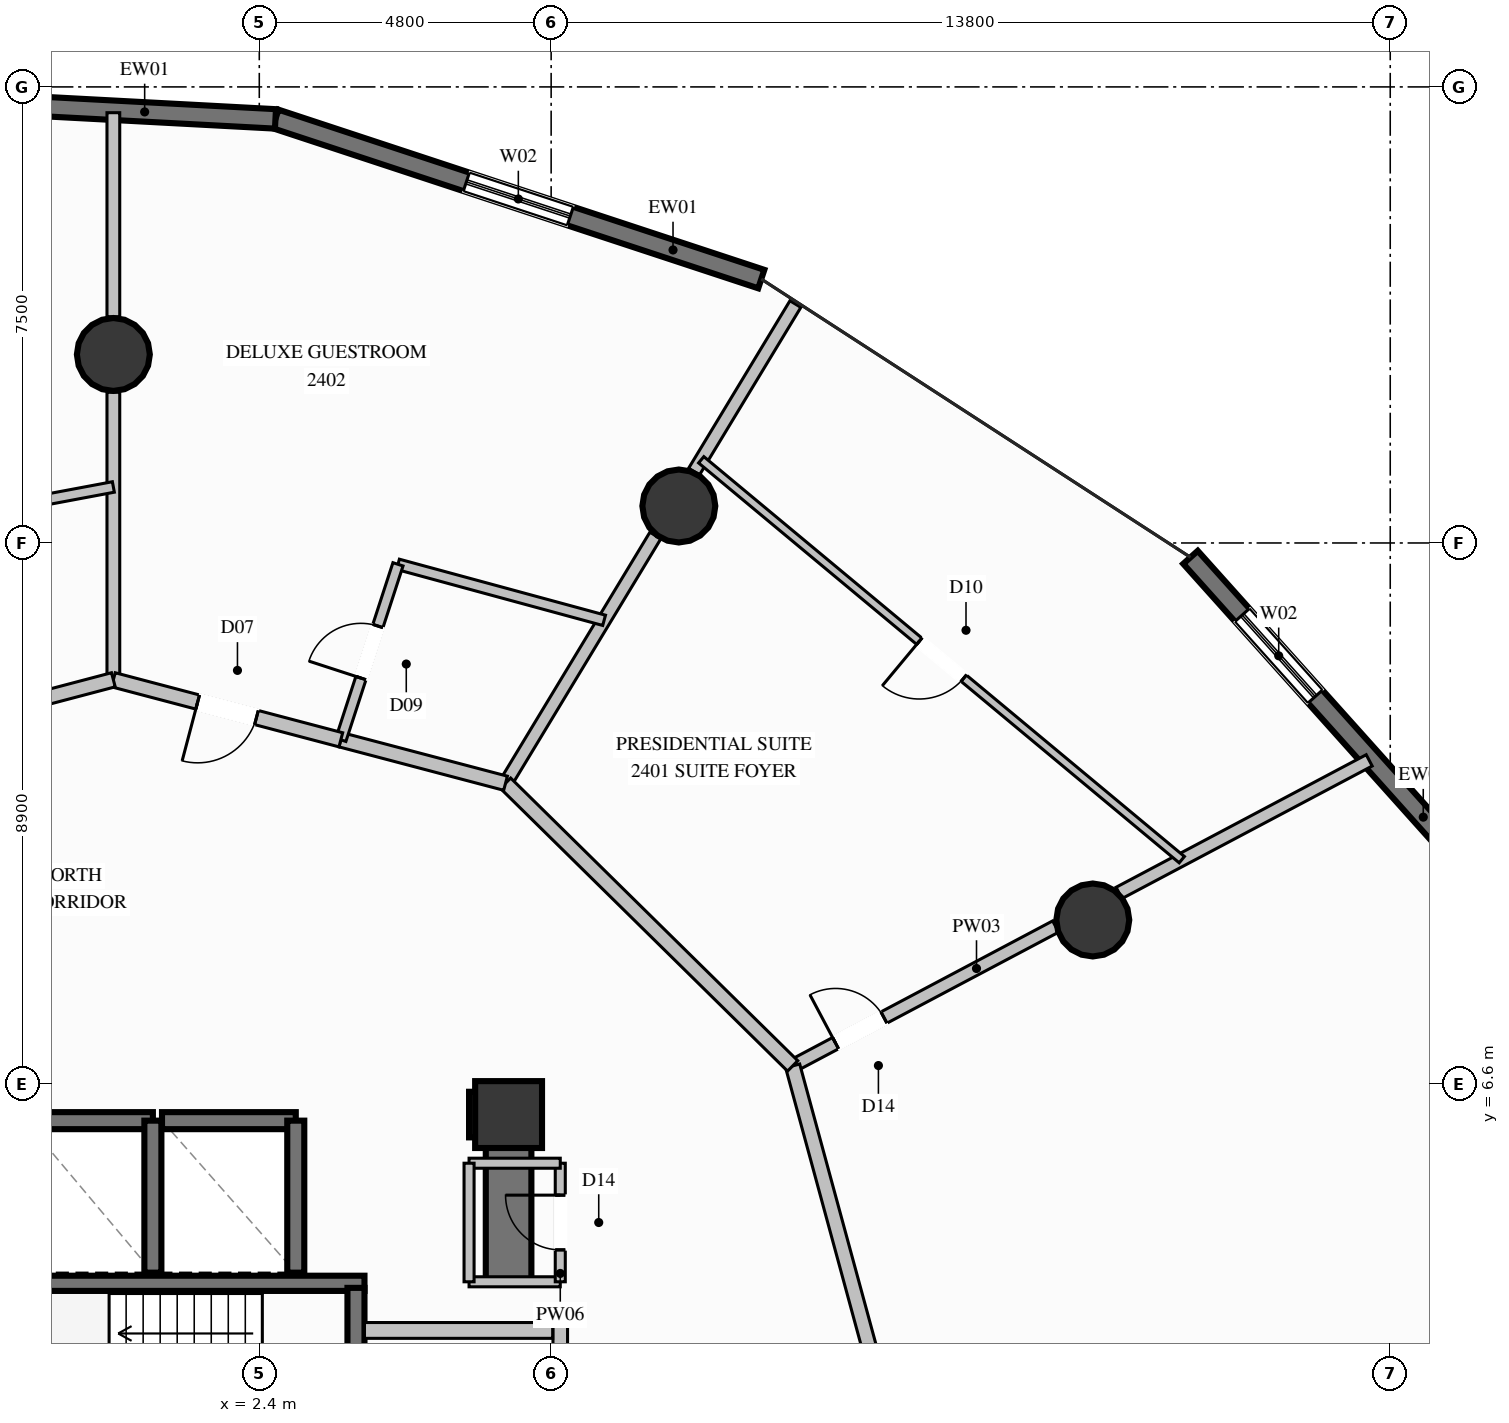
"""IFC4 building model, lengths in metres.
Left out: names, types, materials, properties, quantities, classifications, styles, units other than length and angle.
Written with IfcOpenShell. Run it as: python <this file> out.ifc"""

import sys

from ifc_helpers import new_model, si_unit, direction, frame, frame_2d, origin, origin_2d, place, context, subcontext, project, spatial, rectangle, circle, extrude, element, fill, save


model = new_model("IFC4")
c1 = context("Model", 3, precision=1e-05, world=origin(), true_north=direction((0.0, 1.0)))
c2 = subcontext(c1, "Body", "Model", "MODEL_VIEW")
j1 = project(units=[si_unit("LENGTHUNIT", "METRE"), si_unit("PLANEANGLEUNIT", "RADIAN")], contexts=[c1])
p1 = place(None, origin())
s1 = spatial("IfcSite", under=j1, at=p1, CompositionType="ELEMENT")
p2 = place(p1, origin())
s2 = spatial("IfcBuilding", under=s1, at=p2, CompositionType="ELEMENT")
p3 = place(p2, frame((0.0, 0.0, 89.6)))
s3 = spatial("IfcBuildingStorey", under=s2, at=p3, CompositionType="ELEMENT", Elevation=89.6)
p4 = place(p3, frame((6.5, 6.1, 0.0), z_axis=(0.0, 0.0, 1.0), x_axis=(1.0, 0.0, 0.0)))
e1 = element("IfcColumn", 1, at=p4, inside=s3, PredefinedType="COLUMN", context=c2, shape_type="SweptSolid", body=[
    extrude(rectangle(XDim=1.1, YDim=1.1, at=origin_2d()), origin(), (0.0, 0.0, 1.0), 3.6),
])
p5 = place(p3, frame((-4.13, 3.325, 0.0), z_axis=(0.0, 0.0, 1.0), x_axis=(1.0, 0.0, 0.0)))
e2 = element("IfcWall", 2, at=p5, inside=s3, PredefinedType="SOLIDWALL", context=c2, shape_type="SweptSolid", body=[
    extrude(rectangle(XDim=8.26, YDim=0.25, at=frame_2d((4.13, 0.0))), origin(), (0.0, 0.0, 1.0), 3.6),
])
p6 = place(p3, frame((5.85, 6.1, 0.0), z_axis=(0.0, 0.0, 1.0), x_axis=(1.0, 0.0, 0.0)))
e3 = element("IfcWall", 3, at=p6, inside=s3, PredefinedType="SHEAR", context=c2, shape_type="SweptSolid", body=[
    extrude(rectangle(XDim=0.275, YDim=0.75, at=frame_2d((0.137, 0.0))), origin(), (0.0, 0.0, 1.0), 3.6),
])
p7 = place(p3, frame((6.5, 3.35, 0.0), z_axis=(0.0, 0.0, 1.0), x_axis=(0.0, 1.0, 0.0)))
e4 = element("IfcWall", 4, at=p7, inside=s3, PredefinedType="SHEAR", context=c2, shape_type="SweptSolid", body=[
    extrude(rectangle(XDim=3.125, YDim=0.75, at=frame_2d((1.562, 0.0))), origin(), (0.0, 0.0, 1.0), 3.6),
])
for number, where, z_axis, x_axis in (
    (5, (16.108, 9.3, 0.0), (0.0, 0.0, 1.0), (1.0, 0.0, 0.0)),
    (6, (9.3, 16.108, 0.0), (0.0, 0.0, 1.0), (1.0, 0.0, 0.0)),
    (7, (0.0, 18.6, 0.0), (0.0, 0.0, 1.0), (1.0, 0.0, 0.0)),
):
    element("IfcColumn", number, at=place(p3, frame(where, z_axis=z_axis, x_axis=x_axis)), inside=s3, PredefinedType="COLUMN", context=c2, shape_type="SweptSolid", body=[
        extrude(circle(Radius=0.6, at=origin_2d()), origin(), (0.0, 0.0, 1.0), 3.6),
    ])
p8 = place(p3, frame((17.715, 15.264, 0.0), z_axis=(0.0, 0.0, 1.0), x_axis=(0.667278098427, -0.744808659563, 0.0)))
e8 = element("IfcWall", 8, at=p8, inside=s3, PredefinedType="SOLIDWALL", context=c2, shape_type="SweptSolid", body=[
    extrude(rectangle(XDim=8.149, YDim=0.32, at=frame_2d((4.075, 0.0))), origin(), (0.0, 0.0, 1.0), 3.2),
])
p9 = place(p8, frame((1.274, 0.0, 0.35)))
e9 = element("IfcOpeningElement", 9, at=p9, cuts=e8, PredefinedType="OPENING", context=c2, shape_type="SweptSolid", body=[
    extrude(rectangle(XDim=1.8, YDim=2.6, at=frame_2d((0.9, 1.3))), frame((0.0, 0.17, 0.0), z_axis=(0.0, -1.0, 0.0), x_axis=(1.0, 0.0, 0.0)), (0.0, 0.0, 1.0), 0.34),
])
p10 = place(p3, frame((2.666, 22.474, 0.0), z_axis=(0.0, 0.0, 1.0), x_axis=(0.949722824856, -0.313091928908, 0.0)))
e10 = element("IfcWall", 10, at=p10, inside=s3, PredefinedType="SOLIDWALL", context=c2, shape_type="SweptSolid", body=[
    extrude(rectangle(XDim=8.413, YDim=0.32, at=frame_2d((4.207, 0.0))), origin(), (0.0, 0.0, 1.0), 3.2),
])
p11 = place(p10, frame((3.306, 0.0, 0.35)))
e11 = element("IfcOpeningElement", 11, at=p11, cuts=e10, PredefinedType="OPENING", context=c2, shape_type="SweptSolid", body=[
    extrude(rectangle(XDim=1.8, YDim=2.6, at=frame_2d((0.9, 1.3))), frame((0.0, 0.17, 0.0), z_axis=(0.0, -1.0, 0.0), x_axis=(1.0, 0.0, 0.0)), (0.0, 0.0, 1.0), 0.34),
])
p12 = place(p3, frame((-5.472, 22.908, 0.0), z_axis=(0.0, 0.0, 1.0), x_axis=(0.998582015263, -0.053234939583, 0.0)))
e12 = element("IfcWall", 12, at=p12, inside=s3, PredefinedType="SOLIDWALL", context=c2, shape_type="SweptSolid", body=[
    extrude(rectangle(XDim=8.149, YDim=0.32, at=frame_2d((4.075, 0.0))), origin(), (0.0, 0.0, 1.0), 3.2),
])
p13 = place(p12, frame((1.791, 0.0, 0.35)))
e13 = element("IfcOpeningElement", 13, at=p13, cuts=e12, PredefinedType="OPENING", context=c2, shape_type="SweptSolid", body=[
    extrude(rectangle(XDim=1.8, YDim=2.6, at=frame_2d((0.9, 1.3))), frame((0.0, 0.17, 0.0), z_axis=(0.0, -1.0, 0.0), x_axis=(1.0, 0.0, 0.0)), (0.0, 0.0, 1.0), 0.34),
])
p14 = place(p3, frame((0.65, 6.0, 0.0), z_axis=(0.0, 0.0, 1.0), x_axis=(-1.0, 0.0, 0.0)))
e14 = element("IfcWall", 14, at=p14, inside=s3, PredefinedType="SOLIDWALL", context=c2, shape_type="SweptSolid", body=[
    extrude(rectangle(XDim=2.1, YDim=0.28, at=frame_2d((1.05, 0.0))), origin(), (0.0, 0.0, 1.0), 3.2),
])
p15 = place(p3, frame((0.65, 3.5, 0.0), z_axis=(0.0, 0.0, 1.0), x_axis=(0.0, 1.0, 0.0)))
e15 = element("IfcWall", 15, at=p15, inside=s3, PredefinedType="SOLIDWALL", context=c2, shape_type="SweptSolid", body=[
    extrude(rectangle(XDim=2.5, YDim=0.28, at=frame_2d((1.25, 0.0))), origin(), (0.0, 0.0, 1.0), 3.2),
])
p16 = place(p3, frame((3.0, 6.0, 0.0), z_axis=(0.0, 0.0, 1.0), x_axis=(-1.0, 0.0, 0.0)))
e16 = element("IfcWall", 16, at=p16, inside=s3, PredefinedType="SOLIDWALL", context=c2, shape_type="SweptSolid", body=[
    extrude(rectangle(XDim=2.2, YDim=0.28, at=frame_2d((1.1, 0.0))), origin(), (0.0, 0.0, 1.0), 3.2),
])
p17 = place(p3, frame((3.0, 3.5, 0.0), z_axis=(0.0, 0.0, 1.0), x_axis=(0.0, 1.0, 0.0)))
e17 = element("IfcWall", 17, at=p17, inside=s3, PredefinedType="SOLIDWALL", context=c2, shape_type="SweptSolid", body=[
    extrude(rectangle(XDim=2.5, YDim=0.28, at=frame_2d((1.25, 0.0))), origin(), (0.0, 0.0, 1.0), 3.2),
])
p18 = place(p3, frame((3.99, -2.21, 0.0), z_axis=(0.0, 0.0, 1.0), x_axis=(0.0, 1.0, 0.0)))
e18 = element("IfcWall", 18, at=p18, inside=s3, PredefinedType="SOLIDWALL", context=c2, shape_type="SweptSolid", body=[
    extrude(rectangle(XDim=5.46, YDim=0.28, at=frame_2d((2.73, 0.0))), origin(), (0.0, 0.0, 1.0), 3.2),
])
p19 = place(p18, frame((3.323, 0.0, 0.0)))
e19 = element("IfcOpeningElement", 19, at=p19, cuts=e18, PredefinedType="OPENING", context=c2, shape_type="SweptSolid", body=[
    extrude(rectangle(XDim=1.2, YDim=2.2, at=frame_2d((0.6, 1.1))), frame((0.0, 0.15, 0.0), z_axis=(0.0, -1.0, 0.0), x_axis=(1.0, 0.0, 0.0)), (0.0, 0.0, 1.0), 0.3),
])
p20 = place(p3, frame((7.35, -2.34, 0.0), z_axis=(0.0, 0.0, 1.0), x_axis=(0.0, 1.0, 0.0)))
e20 = element("IfcWall", 20, at=p20, inside=s3, PredefinedType="PARTITIONING", context=c2, shape_type="SweptSolid", body=[
    extrude(rectangle(XDim=5.02, YDim=0.24, at=frame_2d((2.51, 0.0))), origin(), (0.0, 0.0, 1.0), 3.2),
])
p21 = place(p20, frame((2.678, 0.0, 0.0)))
e21 = element("IfcOpeningElement", 21, at=p21, cuts=e20, PredefinedType="OPENING", context=c2, shape_type="SweptSolid", body=[
    extrude(rectangle(XDim=0.9, YDim=2.02, at=frame_2d((0.45, 1.01))), frame((0.0, 0.13, 0.0), z_axis=(0.0, -1.0, 0.0), x_axis=(1.0, 0.0, 0.0)), (0.0, 0.0, 1.0), 0.26),
])
p22 = place(p3, frame((4.13, 2.55, 0.0), z_axis=(0.0, 0.0, 1.0), x_axis=(1.0, 0.0, 0.0)))
e22 = element("IfcWall", 22, at=p22, inside=s3, PredefinedType="PARTITIONING", context=c2, shape_type="SweptSolid", body=[
    extrude(rectangle(XDim=3.095, YDim=0.26, at=frame_2d((1.548, 0.0))), origin(), (0.0, 0.0, 1.0), 3.2),
])
p23 = place(p3, frame((5.85, 3.35, 0.0), z_axis=(0.0, 0.0, 1.0), x_axis=(1.0, 0.0, 0.0)))
e23 = element("IfcWall", 23, at=p23, inside=s3, PredefinedType="PARTITIONING", context=c2, shape_type="SweptSolid", body=[
    extrude(rectangle(XDim=1.5, YDim=0.165, at=frame_2d((0.75, 0.0))), origin(), (0.0, 0.0, 1.0), 3.2),
])
p24 = place(p3, frame((7.35, 3.35, 0.0), z_axis=(0.0, 0.0, 1.0), x_axis=(0.0, 1.0, 0.0)))
e24 = element("IfcWall", 24, at=p24, inside=s3, PredefinedType="PARTITIONING", context=c2, shape_type="SweptSolid", body=[
    extrude(rectangle(XDim=1.95, YDim=0.165, at=frame_2d((0.975, 0.0))), origin(), (0.0, 0.0, 1.0), 3.2),
])
p25 = place(p24, frame((0.525, 0.0, 0.0)))
e25 = element("IfcOpeningElement", 25, at=p25, cuts=e24, PredefinedType="OPENING", context=c2, shape_type="SweptSolid", body=[
    extrude(rectangle(XDim=0.9, YDim=2.02, at=frame_2d((0.45, 1.01))), frame((0.0, 0.093, 0.0), z_axis=(0.0, -1.0, 0.0), x_axis=(1.0, 0.0, 0.0)), (0.0, 0.0, 1.0), 0.185),
])
p26 = place(p3, frame((7.35, 5.3, 0.0), z_axis=(0.0, 0.0, 1.0), x_axis=(-1.0, 0.0, 0.0)))
e26 = element("IfcWall", 26, at=p26, inside=s3, PredefinedType="PARTITIONING", context=c2, shape_type="SweptSolid", body=[
    extrude(rectangle(XDim=1.5, YDim=0.165, at=frame_2d((0.75, 0.0))), origin(), (0.0, 0.0, 1.0), 3.2),
])
p27 = place(p3, frame((5.85, 5.3, 0.0), z_axis=(0.0, 0.0, 1.0), x_axis=(0.0, -1.0, 0.0)))
e27 = element("IfcWall", 27, at=p27, inside=s3, PredefinedType="PARTITIONING", context=c2, shape_type="SweptSolid", body=[
    extrude(rectangle(XDim=1.95, YDim=0.165, at=frame_2d((0.975, 0.0))), origin(), (0.0, 0.0, 1.0), 2.067),
])
p28 = place(p3, frame((11.172, 6.9, 0.0), z_axis=(0.0, 0.0, 1.0), x_axis=(0.883592505471, 0.468256643599, 0.0)))
e28 = element("IfcWall", 28, at=p28, inside=s3, PredefinedType="PARTITIONING", context=c2, shape_type="SweptSolid", body=[
    extrude(rectangle(XDim=4.895, YDim=0.21, at=frame_2d((2.447, 0.0))), origin(), (0.0, 0.0, 1.0), 2.067),
])
p29 = place(p28, frame((0.799, 0.0, 0.0)))
e29 = element("IfcOpeningElement", 29, at=p29, cuts=e28, PredefinedType="OPENING", context=c2, shape_type="SweptSolid", body=[
    extrude(rectangle(XDim=0.9, YDim=2.02, at=frame_2d((0.45, 1.01))), frame((0.0, 0.115, 0.0), z_axis=(0.0, -1.0, 0.0), x_axis=(1.0, 0.0, 0.0)), (0.0, 0.0, 1.0), 0.23),
])
p30 = place(p3, frame((16.54, 9.745, 0.0), z_axis=(0.0, 0.0, 1.0), x_axis=(0.883616940901, 0.468210531441, 0.0)))
e30 = element("IfcWall", 30, at=p30, inside=s3, PredefinedType="PARTITIONING", context=c2, shape_type="SweptSolid", body=[
    extrude(rectangle(XDim=4.656, YDim=0.21, at=frame_2d((2.328, 0.0))), origin(), (0.0, 0.0, 1.0), 3.2),
])
p31 = place(p3, frame((6.45, 11.549, 0.0), z_axis=(0.0, 0.0, 1.0), x_axis=(0.517538966695, 0.855659639081, 0.0)))
e31 = element("IfcWall", 31, at=p31, inside=s3, PredefinedType="PARTITIONING", context=c2, shape_type="SweptSolid", body=[
    extrude(rectangle(XDim=4.761, YDim=0.21, at=frame_2d((2.381, 0.0))), origin(), (0.0, 0.0, 1.0), 2.067),
])
p32 = place(p3, frame((9.551, 16.675, 0.0), z_axis=(0.0, 0.0, 1.0), x_axis=(0.517615669933, 0.855613241038, 0.0)))
e32 = element("IfcWall", 32, at=p32, inside=s3, PredefinedType="PARTITIONING", context=c2, shape_type="SweptSolid", body=[
    extrude(rectangle(XDim=3.219, YDim=0.21, at=frame_2d((1.609, 0.0))), origin(), (0.0, 0.0, 1.0), 3.2),
])
p33 = place(p3, frame((0.0, 13.25, 0.0), z_axis=(0.0, 0.0, 1.0), x_axis=(0.0, 1.0, 0.0)))
e33 = element("IfcWall", 33, at=p33, inside=s3, PredefinedType="PARTITIONING", context=c2, shape_type="SweptSolid", body=[
    extrude(rectangle(XDim=4.73, YDim=0.21, at=frame_2d((2.365, 0.0))), origin(), (0.0, 0.0, 1.0), 2.067),
])
p34 = place(p3, frame((0.0, 19.22, 0.0), z_axis=(0.0, 0.0, 1.0), x_axis=(0.0, 1.0, 0.0)))
e34 = element("IfcWall", 34, at=p34, inside=s3, PredefinedType="PARTITIONING", context=c2, shape_type="SweptSolid", body=[
    extrude(rectangle(XDim=3.356, YDim=0.21, at=frame_2d((1.678, 0.0))), origin(), (0.0, 0.0, 1.0), 3.2),
])
p35 = place(p3, frame((12.9, 0.55, 0.0), z_axis=(0.0, 0.0, 1.0), x_axis=(-0.262552308576, 0.96491776088, 0.0)))
e35 = element("IfcWall", 35, at=p35, inside=s3, PredefinedType="PARTITIONING", context=c2, shape_type="SweptSolid", body=[
    extrude(rectangle(XDim=6.581, YDim=0.24, at=frame_2d((3.291, 0.0))), origin(), (0.0, 0.0, 1.0), 3.2),
])
p36 = place(p3, frame((11.172, 6.9, 0.0), z_axis=(0.0, 0.0, 1.0), x_axis=(-0.712593171801, 0.701577487882, 0.0)))
e36 = element("IfcWall", 36, at=p36, inside=s3, PredefinedType="PARTITIONING", context=c2, shape_type="SweptSolid", body=[
    extrude(rectangle(XDim=6.627, YDim=0.24, at=frame_2d((3.313, 0.0))), origin(), (0.0, 0.0, 1.0), 3.2),
])
p37 = place(p3, frame((17.572, 10.292, 0.0), z_axis=(0.0, 0.0, 1.0), x_axis=(-0.768736797736, 0.639565270951, 0.0)))
e37 = element("IfcWall", 37, at=p37, inside=s3, PredefinedType="PARTITIONING", context=c2, shape_type="SweptSolid", body=[
    extrude(rectangle(XDim=10.282, YDim=0.135, at=frame_2d((5.141, 0.0))), origin(), (0.0, 0.0, 1.0), 3.2),
])
p38 = place(p37, frame((4.666, 0.0, 0.0)))
e38 = element("IfcOpeningElement", 38, at=p38, cuts=e37, PredefinedType="OPENING", context=c2, shape_type="SweptSolid", body=[
    extrude(rectangle(XDim=0.95, YDim=2.1, at=frame_2d((0.475, 1.05))), frame((0.0, 0.078, 0.0), z_axis=(0.0, -1.0, 0.0), x_axis=(1.0, 0.0, 0.0)), (0.0, 0.0, 1.0), 0.155),
])
p39 = place(p3, frame((6.45, 11.549, 0.0), z_axis=(0.0, 0.0, 1.0), x_axis=(-0.966988689433, 0.254819297756, 0.0)))
e39 = element("IfcWall", 39, at=p39, inside=s3, PredefinedType="PARTITIONING", context=c2, shape_type="SweptSolid", body=[
    extrude(rectangle(XDim=2.802, YDim=0.24, at=frame_2d((1.401, 0.0))), origin(), (0.0, 0.0, 1.0), 3.2),
])
p40 = place(p3, frame((8.071, 14.228, 0.0), z_axis=(0.0, 0.0, 1.0), x_axis=(-0.965029552765, 0.262141111409, 0.0)))
e40 = element("IfcWall", 40, at=p40, inside=s3, PredefinedType="PLUMBINGWALL", context=c2, shape_type="SweptSolid", body=[
    extrude(rectangle(XDim=3.513, YDim=0.175, at=frame_2d((1.756, 0.0))), origin(), (0.0, 0.0, 1.0), 3.2),
])
p41 = place(p3, frame((3.741, 12.263, 0.0), z_axis=(0.0, 0.0, 1.0), x_axis=(0.309680760467, 0.950840589477, 0.0)))
e41 = element("IfcWall", 41, at=p41, inside=s3, PredefinedType="PLUMBINGWALL", context=c2, shape_type="SweptSolid", body=[
    extrude(rectangle(XDim=3.035, YDim=0.175, at=frame_2d((1.518, 0.0))), origin(), (0.0, 0.0, 1.0), 3.2),
])
p42 = place(p41, frame((1.068, 0.0, 0.0)))
e42 = element("IfcOpeningElement", 42, at=p42, cuts=e41, PredefinedType="OPENING", context=c2, shape_type="SweptSolid", body=[
    extrude(rectangle(XDim=0.9, YDim=2.1, at=frame_2d((0.45, 1.05))), frame((0.0, 0.098, 0.0), z_axis=(0.0, -1.0, 0.0), x_axis=(1.0, 0.0, 0.0)), (0.0, 0.0, 1.0), 0.195),
])
p43 = place(p3, frame((3.741, 12.263, 0.0), z_axis=(0.0, 0.0, 1.0), x_axis=(-0.966909222747, 0.255120667465, 0.0)))
e43 = element("IfcWall", 43, at=p43, inside=s3, PredefinedType="PARTITIONING", context=c2, shape_type="SweptSolid", body=[
    extrude(rectangle(XDim=3.869, YDim=0.24, at=frame_2d((1.935, 0.0))), origin(), (0.0, 0.0, 1.0), 3.2),
])
p44 = place(p43, frame((1.435, 0.0, 0.0)))
e44 = element("IfcOpeningElement", 44, at=p44, cuts=e43, PredefinedType="OPENING", context=c2, shape_type="SweptSolid", body=[
    extrude(rectangle(XDim=1.0, YDim=2.2, at=frame_2d((0.5, 1.1))), frame((0.0, 0.13, 0.0), z_axis=(0.0, -1.0, 0.0), x_axis=(1.0, 0.0, 0.0)), (0.0, 0.0, 1.0), 0.26),
])
p45 = place(p3, frame((0.0, 13.25, 0.0), z_axis=(0.0, 0.0, 1.0), x_axis=(-0.966967212689, -0.254900783806, 0.0)))
e45 = element("IfcWall", 45, at=p45, inside=s3, PredefinedType="PARTITIONING", context=c2, shape_type="SweptSolid", body=[
    extrude(rectangle(XDim=2.802, YDim=0.24, at=frame_2d((1.401, 0.0))), origin(), (0.0, 0.0, 1.0), 3.2),
])
p46 = place(p3, frame((0.0, 16.421, 0.0), z_axis=(0.0, 0.0, 1.0), x_axis=(-0.982899817201, -0.184141112593, 0.0)))
e46 = element("IfcWall", 46, at=p46, inside=s3, PredefinedType="PLUMBINGWALL", context=c2, shape_type="SweptSolid", body=[
    extrude(rectangle(XDim=3.6, YDim=0.175, at=frame_2d((1.8, 0.0))), origin(), (0.0, 0.0, 1.0), 3.2),
])
p47 = place(p9, origin())
e47 = element("IfcWindow", 47, at=p47, inside=s3, PartitioningType="SINGLE_PANEL", PredefinedType="WINDOW", context=c2, shape_type="SweptSolid", body=[
    extrude(rectangle(XDim=1.8, YDim=2.6, at=frame_2d((0.9, 1.3))), frame((0.0, 0.03, 0.0), z_axis=(0.0, -1.0, 0.0), x_axis=(1.0, 0.0, 0.0)), (0.0, 0.0, 1.0), 0.06),
])
fill(e9, e47)
p48 = place(p11, origin())
e48 = element("IfcWindow", 48, at=p48, inside=s3, PartitioningType="SINGLE_PANEL", PredefinedType="WINDOW", context=c2, shape_type="SweptSolid", body=[
    extrude(rectangle(XDim=1.8, YDim=2.6, at=frame_2d((0.9, 1.3))), frame((0.0, 0.03, 0.0), z_axis=(0.0, -1.0, 0.0), x_axis=(1.0, 0.0, 0.0)), (0.0, 0.0, 1.0), 0.06),
])
fill(e11, e48)
p49 = place(p25, origin())
e49 = element("IfcDoor", 49, at=p49, inside=s3, OperationType="SINGLE_SWING_RIGHT", PredefinedType="DOOR", context=c2, shape_type="SweptSolid", body=[
    extrude(rectangle(XDim=0.9, YDim=2.02, at=frame_2d((0.45, 1.01))), frame((0.0, 0.025, 0.0), z_axis=(0.0, -1.0, 0.0), x_axis=(1.0, 0.0, 0.0)), (0.0, 0.0, 1.0), 0.05),
])
fill(e25, e49)
p50 = place(p29, origin())
e50 = element("IfcDoor", 50, at=p50, inside=s3, OperationType="SINGLE_SWING_LEFT", PredefinedType="DOOR", context=c2, shape_type="SweptSolid", body=[
    extrude(rectangle(XDim=0.9, YDim=2.02, at=frame_2d((0.45, 1.01))), frame((0.0, 0.025, 0.0), z_axis=(0.0, -1.0, 0.0), x_axis=(1.0, 0.0, 0.0)), (0.0, 0.0, 1.0), 0.05),
])
fill(e29, e50)
p51 = place(p38, origin())
e51 = element("IfcDoor", 51, at=p51, inside=s3, OperationType="SINGLE_SWING_RIGHT", PredefinedType="DOOR", context=c2, shape_type="SweptSolid", body=[
    extrude(rectangle(XDim=0.95, YDim=2.1, at=frame_2d((0.475, 1.05))), frame((0.0, 0.025, 0.0), z_axis=(0.0, -1.0, 0.0), x_axis=(1.0, 0.0, 0.0)), (0.0, 0.0, 1.0), 0.05),
])
fill(e38, e51)
p52 = place(p42, origin())
e52 = element("IfcDoor", 52, at=p52, inside=s3, OperationType="SINGLE_SWING_LEFT", PredefinedType="DOOR", context=c2, shape_type="SweptSolid", body=[
    extrude(rectangle(XDim=0.9, YDim=2.1, at=frame_2d((0.45, 1.05))), frame((0.0, 0.025, 0.0), z_axis=(0.0, -1.0, 0.0), x_axis=(1.0, 0.0, 0.0)), (0.0, 0.0, 1.0), 0.05),
])
fill(e42, e52)
p53 = place(p44, origin())
e53 = element("IfcDoor", 53, at=p53, inside=s3, OperationType="SINGLE_SWING_RIGHT", PredefinedType="DOOR", context=c2, shape_type="SweptSolid", body=[
    extrude(rectangle(XDim=1.0, YDim=2.2, at=frame_2d((0.5, 1.1))), frame((0.0, 0.025, 0.0), z_axis=(0.0, -1.0, 0.0), x_axis=(1.0, 0.0, 0.0)), (0.0, 0.0, 1.0), 0.05),
])
fill(e44, e53)
save(model, sys.argv[1])
